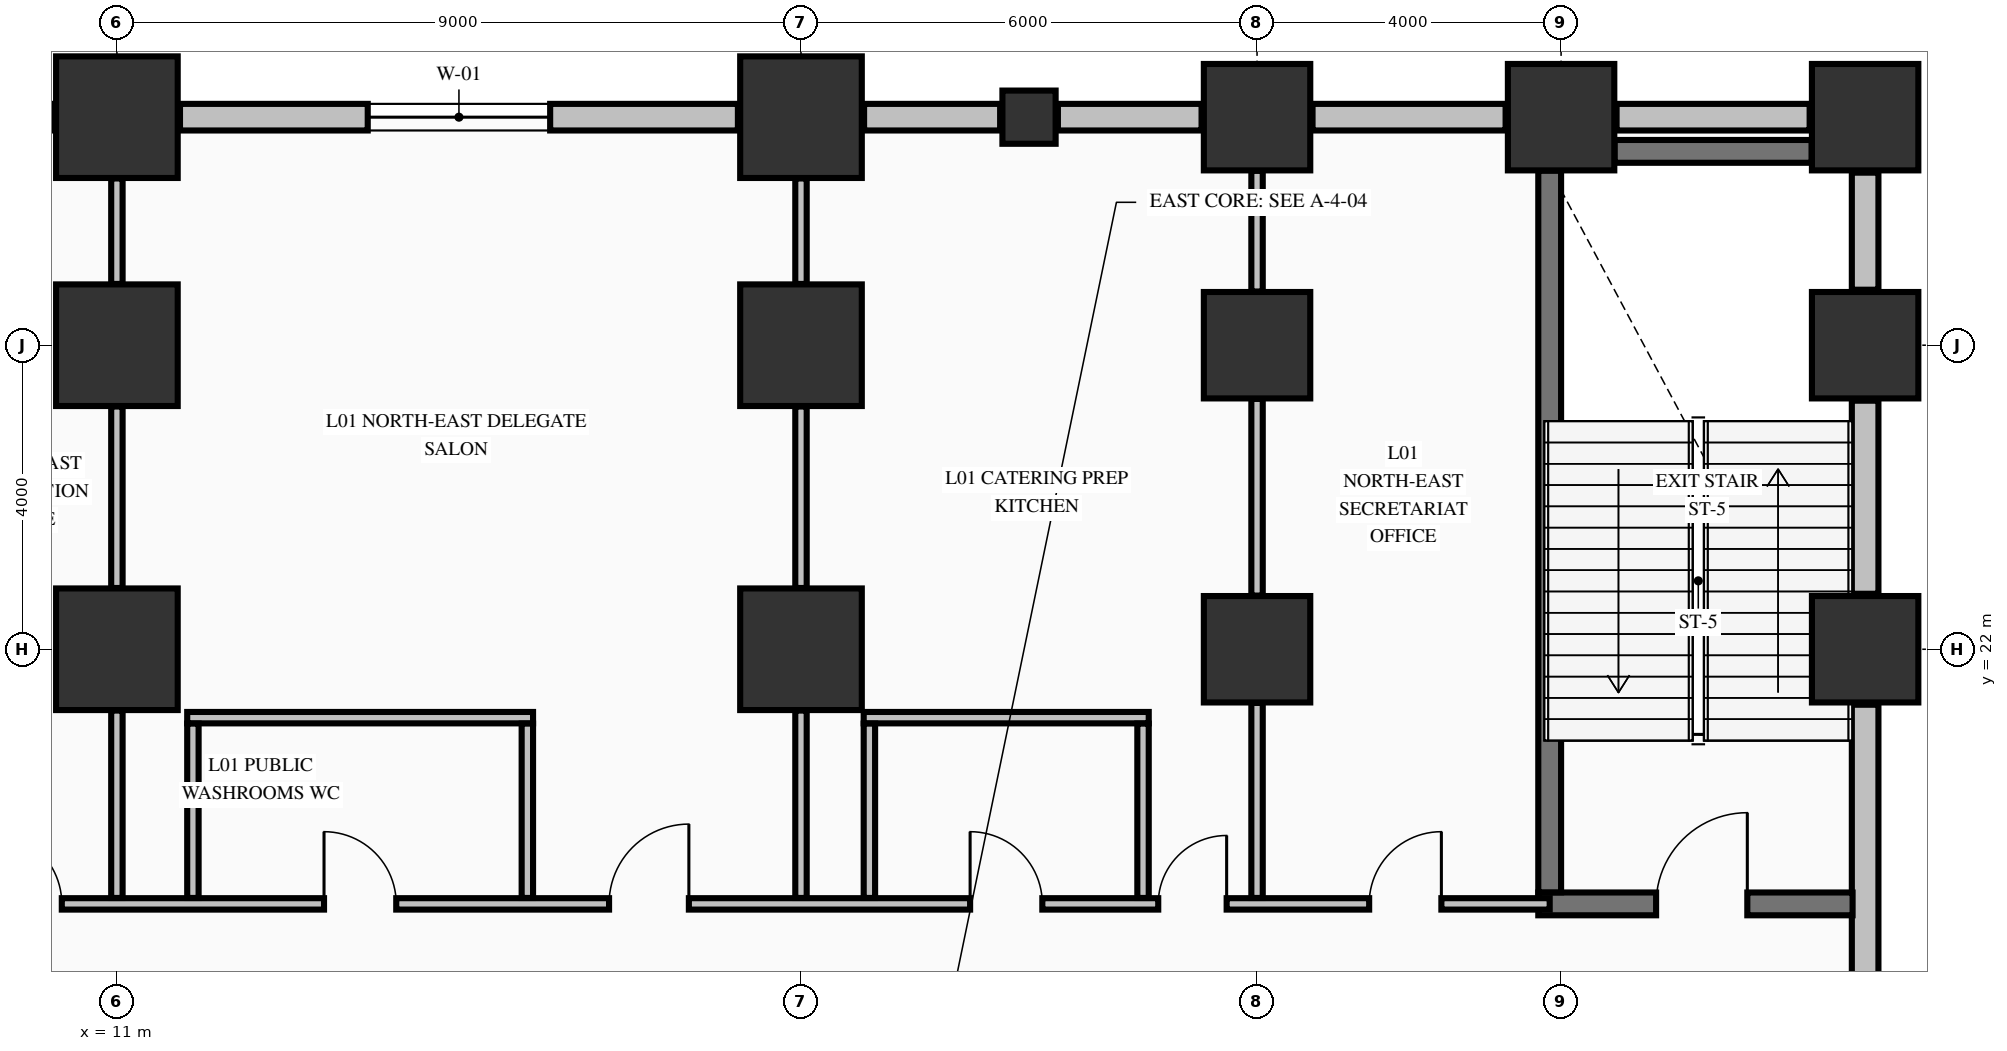
"""IFC4 building model, lengths in metres.
Left out: names, types, materials, properties, quantities, classifications, styles, units other than length and angle.
Written with IfcOpenShell. Run it as: python <this file> out.ifc"""

import sys

from ifc_helpers import new_model, si_unit, direction, frame, frame_2d, origin, origin_2d, place, context, subcontext, project, spatial, rectangle, extrude, element, fill, save


model = new_model("IFC4")
c1 = context("Model", 3, precision=1e-05, world=origin(), true_north=direction((0.0, 1.0)))
c2 = subcontext(c1, "Body", "Model", "MODEL_VIEW")
j1 = project(units=[si_unit("LENGTHUNIT", "METRE"), si_unit("PLANEANGLEUNIT", "RADIAN")], contexts=[c1])
p1 = place(None, origin())
s1 = spatial("IfcSite", under=j1, at=p1, CompositionType="ELEMENT")
p2 = place(p1, origin())
s2 = spatial("IfcBuilding", under=s1, at=p2, CompositionType="ELEMENT")
p3 = place(p2, frame((0.0, 0.0, 5.44)))
s3 = spatial("IfcBuildingStorey", under=s2, at=p3, CompositionType="ELEMENT", Elevation=5.44)
for number, where, z_axis, x_axis in (
    (1, (11.0, 22.0, 0.0), (0.0, 0.0, 1.0), (1.0, 0.0, 0.0)),
    (2, (11.0, 26.0, 0.0), (0.0, 0.0, 1.0), (1.0, 0.0, 0.0)),
    (3, (11.0, 29.0, 0.0), (0.0, 0.0, 1.0), (1.0, 0.0, 0.0)),
    (4, (20.0, 22.0, 0.0), (0.0, 0.0, 1.0), (1.0, 0.0, 0.0)),
    (5, (20.0, 26.0, 0.0), (0.0, 0.0, 1.0), (1.0, 0.0, 0.0)),
    (6, (20.0, 29.0, 0.0), (0.0, 0.0, 1.0), (1.0, 0.0, 0.0)),
):
    element("IfcColumn", number, at=place(p3, frame(where, z_axis=z_axis, x_axis=x_axis)), inside=s3, PredefinedType="COLUMN", context=c2, shape_type="SweptSolid", body=[
        extrude(rectangle(XDim=1.6, YDim=1.6, at=origin_2d()), origin(), (0.0, 0.0, 1.0), 5.09),
    ])
for number, where, z_axis, x_axis in (
    (7, (26.0, 22.0, 0.0), (0.0, 0.0, 1.0), (1.0, 0.0, 0.0)),
    (8, (26.0, 26.0, 0.0), (0.0, 0.0, 1.0), (1.0, 0.0, 0.0)),
    (9, (26.0, 29.0, 0.0), (0.0, 0.0, 1.0), (1.0, 0.0, 0.0)),
    (10, (30.0, 29.0, 0.0), (0.0, 0.0, 1.0), (1.0, 0.0, 0.0)),
    (11, (34.0, 22.0, 0.0), (0.0, 0.0, 1.0), (1.0, 0.0, 0.0)),
    (12, (34.0, 26.0, 0.0), (0.0, 0.0, 1.0), (1.0, 0.0, 0.0)),
    (13, (34.0, 29.0, 0.0), (0.0, 0.0, 1.0), (1.0, 0.0, 0.0)),
):
    element("IfcColumn", number, at=place(p3, frame(where, z_axis=z_axis, x_axis=x_axis)), inside=s3, PredefinedType="COLUMN", context=c2, shape_type="SweptSolid", body=[
        extrude(rectangle(XDim=1.4, YDim=1.4, at=origin_2d()), origin(), (0.0, 0.0, 1.0), 5.09),
    ])
p4 = place(p3, frame((23.0, 29.0, 0.0), z_axis=(0.0, 0.0, 1.0), x_axis=(1.0, 0.0, 0.0)))
e14 = element("IfcColumn", 14, at=p4, inside=s3, PredefinedType="PILASTER", context=c2, shape_type="SweptSolid", body=[
    extrude(rectangle(XDim=0.7, YDim=0.7, at=origin_2d()), origin(), (0.0, 0.0, 1.0), 5.09),
])
p5 = place(p3, frame((10.17, 29.0, 0.0), z_axis=(0.0, 0.0, 1.0), x_axis=(-1.0, 0.0, 0.0)))
e15 = element("IfcWall", 15, at=p5, inside=s3, PredefinedType="STANDARD", context=c2, shape_type="SweptSolid", body=[
    extrude(rectangle(XDim=0.94, YDim=0.35, at=frame_2d((0.47, 0.0))), origin(), (0.0, 0.0, 1.0), 4.482),
])
p6 = place(p3, frame((19.17, 29.0, 0.0), z_axis=(0.0, 0.0, 1.0), x_axis=(-1.0, 0.0, 0.0)))
e16 = element("IfcWall", 16, at=p6, inside=s3, PredefinedType="STANDARD", context=c2, shape_type="SweptSolid", body=[
    extrude(rectangle(XDim=7.34, YDim=0.35, at=frame_2d((3.67, 0.0))), origin(), (0.0, 0.0, 1.0), 4.482),
])
p7 = place(p6, frame((2.47, 0.0, 0.85)))
e17 = element("IfcOpeningElement", 17, at=p7, cuts=e16, PredefinedType="OPENING", context=c2, shape_type="SweptSolid", body=[
    extrude(rectangle(XDim=2.4, YDim=2.1, at=frame_2d((1.2, 1.05))), frame((0.0, 0.185, 0.0), z_axis=(0.0, -1.0, 0.0), x_axis=(1.0, 0.0, 0.0)), (0.0, 0.0, 1.0), 0.37),
])
p8 = place(p3, frame((22.62, 29.0, 0.0), z_axis=(0.0, 0.0, 1.0), x_axis=(-1.0, 0.0, 0.0)))
e18 = element("IfcWall", 18, at=p8, inside=s3, PredefinedType="STANDARD", context=c2, shape_type="SweptSolid", body=[
    extrude(rectangle(XDim=1.79, YDim=0.35, at=frame_2d((0.895, 0.0))), origin(), (0.0, 0.0, 1.0), 4.482),
])
p9 = place(p3, frame((25.27, 29.0, 0.0), z_axis=(0.0, 0.0, 1.0), x_axis=(-1.0, 0.0, 0.0)))
e19 = element("IfcWall", 19, at=p9, inside=s3, PredefinedType="STANDARD", context=c2, shape_type="SweptSolid", body=[
    extrude(rectangle(XDim=1.89, YDim=0.35, at=frame_2d((0.945, 0.0))), origin(), (0.0, 0.0, 1.0), 4.482),
])
for number, where, z_axis, x_axis in (
    (20, (29.27, 29.0, 0.0), (0.0, 0.0, 1.0), (-1.0, 0.0, 0.0)),
    (21, (33.27, 29.0, 0.0), (0.0, 0.0, 1.0), (-1.0, 0.0, 0.0)),
):
    element("IfcWall", number, at=place(p3, frame(where, z_axis=z_axis, x_axis=x_axis)), inside=s3, PredefinedType="STANDARD", context=c2, shape_type="SweptSolid", body=[
        extrude(rectangle(XDim=2.54, YDim=0.35, at=frame_2d((1.27, 0.0))), origin(), (0.0, 0.0, 1.0), 4.482),
    ])
p10 = place(p3, frame((34.0, 21.27, 0.0), z_axis=(0.0, 0.0, 1.0), x_axis=(0.0, -1.0, 0.0)))
e22 = element("IfcWall", 22, at=p10, inside=s3, PredefinedType="STANDARD", context=c2, shape_type="SweptSolid", body=[
    extrude(rectangle(XDim=4.54, YDim=0.35, at=frame_2d((2.27, 0.0))), origin(), (0.0, 0.0, 1.0), 5.09),
])
p11 = place(p3, frame((34.0, 25.27, 0.0), z_axis=(0.0, 0.0, 1.0), x_axis=(0.0, -1.0, 0.0)))
e23 = element("IfcWall", 23, at=p11, inside=s3, PredefinedType="STANDARD", context=c2, shape_type="SweptSolid", body=[
    extrude(rectangle(XDim=2.54, YDim=0.35, at=frame_2d((1.27, 0.0))), origin(), (0.0, 0.0, 1.0), 5.09),
])
p12 = place(p3, frame((34.0, 28.27, 0.0), z_axis=(0.0, 0.0, 1.0), x_axis=(0.0, -1.0, 0.0)))
e24 = element("IfcWall", 24, at=p12, inside=s3, PredefinedType="STANDARD", context=c2, shape_type="SweptSolid", body=[
    extrude(rectangle(XDim=1.54, YDim=0.35, at=frame_2d((0.77, 0.0))), origin(), (0.0, 0.0, 1.0), 5.09),
])
p13 = place(p3, frame((29.7, 18.65, 0.0), z_axis=(0.0, 0.0, 1.0), x_axis=(1.0, 0.0, 0.0)))
e25 = element("IfcWall", 25, at=p13, inside=s3, PredefinedType="SHEAR", context=c2, shape_type="SweptSolid", body=[
    extrude(rectangle(XDim=4.135, YDim=0.3, at=frame_2d((2.067, 0.0))), origin(), (0.0, 0.0, 1.0), 5.09),
])
p14 = place(p13, frame((1.55, 0.0, 0.0)))
e26 = element("IfcOpeningElement", 26, at=p14, cuts=e25, PredefinedType="OPENING", context=c2, shape_type="SweptSolid", body=[
    extrude(rectangle(XDim=1.2, YDim=2.15, at=frame_2d((0.6, 1.075))), frame((0.0, 0.16, 0.0), z_axis=(0.0, -1.0, 0.0), x_axis=(1.0, 0.0, 0.0)), (0.0, 0.0, 1.0), 0.32),
])
p15 = place(p3, frame((30.704, 28.55, 0.0), z_axis=(0.0, 0.0, 1.0), x_axis=(1.0, 0.0, 0.0)))
e27 = element("IfcWall", 27, at=p15, inside=s3, PredefinedType="SHEAR", context=c2, shape_type="SweptSolid", body=[
    extrude(rectangle(XDim=2.592, YDim=0.3, at=frame_2d((1.296, 0.0))), origin(), (0.0, 0.0, 1.0), 5.09),
])
p16 = place(p3, frame((-33.835, 18.65, 0.0), z_axis=(0.0, 0.0, 1.0), x_axis=(1.0, 0.0, 0.0)))
e28 = element("IfcWall", 28, at=p16, inside=s3, PredefinedType="PARTITIONING", context=c2, shape_type="SweptSolid", body=[
    extrude(rectangle(XDim=63.685, YDim=0.15, at=frame_2d((31.843, 0.0))), origin(), (0.0, 0.0, 1.0), 5.09),
])
p17 = place(p16, frame((1.285, 0.0, 0.0)))
e29 = element("IfcOpeningElement", 29, at=p17, cuts=e28, PredefinedType="OPENING", context=c2, shape_type="SweptSolid", body=[
    extrude(rectangle(XDim=1.1, YDim=2.15, at=frame_2d((0.55, 1.075))), frame((0.0, 0.085, 0.0), z_axis=(0.0, -1.0, 0.0), x_axis=(1.0, 0.0, 0.0)), (0.0, 0.0, 1.0), 0.17),
])
p18 = place(p16, frame((5.285, 0.0, 0.0)))
e30 = element("IfcOpeningElement", 30, at=p18, cuts=e28, PredefinedType="OPENING", context=c2, shape_type="SweptSolid", body=[
    extrude(rectangle(XDim=1.1, YDim=2.15, at=frame_2d((0.55, 1.075))), frame((0.0, 0.085, 0.0), z_axis=(0.0, -1.0, 0.0), x_axis=(1.0, 0.0, 0.0)), (0.0, 0.0, 1.0), 0.17),
])
p19 = place(p16, frame((10.285, 0.0, 0.0)))
e31 = element("IfcOpeningElement", 31, at=p19, cuts=e28, PredefinedType="OPENING", context=c2, shape_type="SweptSolid", body=[
    extrude(rectangle(XDim=1.1, YDim=2.15, at=frame_2d((0.55, 1.075))), frame((0.0, 0.085, 0.0), z_axis=(0.0, -1.0, 0.0), x_axis=(1.0, 0.0, 0.0)), (0.0, 0.0, 1.0), 0.17),
])
p20 = place(p16, frame((17.785, 0.0, 0.0)))
e32 = element("IfcOpeningElement", 32, at=p20, cuts=e28, PredefinedType="OPENING", context=c2, shape_type="SweptSolid", body=[
    extrude(rectangle(XDim=1.1, YDim=2.15, at=frame_2d((0.55, 1.075))), frame((0.0, 0.085, 0.0), z_axis=(0.0, -1.0, 0.0), x_axis=(1.0, 0.0, 0.0)), (0.0, 0.0, 1.0), 0.17),
])
p21 = place(p16, frame((23.56, 0.0, 0.0)))
e33 = element("IfcOpeningElement", 33, at=p21, cuts=e28, PredefinedType="OPENING", context=c2, shape_type="SweptSolid", body=[
    extrude(rectangle(XDim=0.95, YDim=2.15, at=frame_2d((0.475, 1.075))), frame((0.0, 0.085, 0.0), z_axis=(0.0, -1.0, 0.0), x_axis=(1.0, 0.0, 0.0)), (0.0, 0.0, 1.0), 0.17),
])
p22 = place(p16, frame((28.985, 0.0, 0.0)))
e34 = element("IfcOpeningElement", 34, at=p22, cuts=e28, PredefinedType="OPENING", context=c2, shape_type="SweptSolid", body=[
    extrude(rectangle(XDim=1.1, YDim=2.15, at=frame_2d((0.55, 1.075))), frame((0.0, 0.085, 0.0), z_axis=(0.0, -1.0, 0.0), x_axis=(1.0, 0.0, 0.0)), (0.0, 0.0, 1.0), 0.17),
])
p23 = place(p16, frame((37.585, 0.0, 0.0)))
e35 = element("IfcOpeningElement", 35, at=p23, cuts=e28, PredefinedType="OPENING", context=c2, shape_type="SweptSolid", body=[
    extrude(rectangle(XDim=1.1, YDim=2.15, at=frame_2d((0.55, 1.075))), frame((0.0, 0.085, 0.0), z_axis=(0.0, -1.0, 0.0), x_axis=(1.0, 0.0, 0.0)), (0.0, 0.0, 1.0), 0.17),
])
p24 = place(p16, frame((43.16, 0.0, 0.0)))
e36 = element("IfcOpeningElement", 36, at=p24, cuts=e28, PredefinedType="OPENING", context=c2, shape_type="SweptSolid", body=[
    extrude(rectangle(XDim=0.95, YDim=2.15, at=frame_2d((0.475, 1.075))), frame((0.0, 0.085, 0.0), z_axis=(0.0, -1.0, 0.0), x_axis=(1.0, 0.0, 0.0)), (0.0, 0.0, 1.0), 0.17),
])
p25 = place(p16, frame((61.31, 0.0, 0.0)))
e37 = element("IfcOpeningElement", 37, at=p25, cuts=e28, PredefinedType="OPENING", context=c2, shape_type="SweptSolid", body=[
    extrude(rectangle(XDim=0.95, YDim=2.15, at=frame_2d((0.475, 1.075))), frame((0.0, 0.085, 0.0), z_axis=(0.0, -1.0, 0.0), x_axis=(1.0, 0.0, 0.0)), (0.0, 0.0, 1.0), 0.17),
])
p26 = place(p16, frame((47.56, 0.0, 0.0)))
e38 = element("IfcOpeningElement", 38, at=p26, cuts=e28, PredefinedType="OPENING", context=c2, shape_type="SweptSolid", body=[
    extrude(rectangle(XDim=0.95, YDim=2.15, at=frame_2d((0.475, 1.075))), frame((0.0, 0.085, 0.0), z_axis=(0.0, -1.0, 0.0), x_axis=(1.0, 0.0, 0.0)), (0.0, 0.0, 1.0), 0.17),
])
p27 = place(p16, frame((51.31, 0.0, 0.0)))
e39 = element("IfcOpeningElement", 39, at=p27, cuts=e28, PredefinedType="OPENING", context=c2, shape_type="SweptSolid", body=[
    extrude(rectangle(XDim=1.05, YDim=2.15, at=frame_2d((0.525, 1.075))), frame((0.0, 0.085, 0.0), z_axis=(0.0, -1.0, 0.0), x_axis=(1.0, 0.0, 0.0)), (0.0, 0.0, 1.0), 0.17),
])
p28 = place(p16, frame((56.06, 0.0, 0.0)))
e40 = element("IfcOpeningElement", 40, at=p28, cuts=e28, PredefinedType="OPENING", context=c2, shape_type="SweptSolid", body=[
    extrude(rectangle(XDim=0.95, YDim=2.15, at=frame_2d((0.475, 1.075))), frame((0.0, 0.085, 0.0), z_axis=(0.0, -1.0, 0.0), x_axis=(1.0, 0.0, 0.0)), (0.0, 0.0, 1.0), 0.17),
])
p29 = place(p16, frame((58.535, 0.0, 0.0)))
e41 = element("IfcOpeningElement", 41, at=p29, cuts=e28, PredefinedType="OPENING", context=c2, shape_type="SweptSolid", body=[
    extrude(rectangle(XDim=0.9, YDim=2.15, at=frame_2d((0.45, 1.075))), frame((0.0, 0.085, 0.0), z_axis=(0.0, -1.0, 0.0), x_axis=(1.0, 0.0, 0.0)), (0.0, 0.0, 1.0), 0.17),
])
p30 = place(p3, frame((11.925, 21.1, 0.0), z_axis=(0.0, 0.0, 1.0), x_axis=(1.0, 0.0, 0.0)))
e42 = element("IfcWall", 42, at=p30, inside=s3, PredefinedType="PARTITIONING", context=c2, shape_type="SweptSolid", body=[
    extrude(rectangle(XDim=4.55, YDim=0.15, at=frame_2d((2.275, 0.0))), origin(), (0.0, 0.0, 1.0), 5.09),
])
p31 = place(p3, frame((20.825, 21.1, 0.0), z_axis=(0.0, 0.0, 1.0), x_axis=(1.0, 0.0, 0.0)))
e43 = element("IfcWall", 43, at=p31, inside=s3, PredefinedType="PARTITIONING", context=c2, shape_type="SweptSolid", body=[
    extrude(rectangle(XDim=3.75, YDim=0.15, at=frame_2d((1.875, 0.0))), origin(), (0.0, 0.0, 1.0), 5.09),
])
p32 = place(p3, frame((29.85, 18.802, 0.0), z_axis=(0.0, 0.0, 1.0), x_axis=(0.0, 1.0, 0.0)))
e44 = element("IfcWall", 44, at=p32, inside=s3, PredefinedType="SHEAR", context=c2, shape_type="SweptSolid", body=[
    extrude(rectangle(XDim=9.494, YDim=0.3, at=frame_2d((4.747, 0.0))), origin(), (0.0, 0.0, 1.0), 5.09),
])
p33 = place(p3, frame((11.0, 18.728, 0.0), z_axis=(0.0, 0.0, 1.0), x_axis=(0.0, 1.0, 0.0)))
e45 = element("IfcWall", 45, at=p33, inside=s3, PredefinedType="PARTITIONING", context=c2, shape_type="SweptSolid", body=[
    extrude(rectangle(XDim=2.466, YDim=0.15, at=frame_2d((1.233, 0.0))), origin(), (0.0, 0.0, 1.0), 4.132),
])
p34 = place(p3, frame((11.0, 22.806, 0.0), z_axis=(0.0, 0.0, 1.0), x_axis=(0.0, 1.0, 0.0)))
e46 = element("IfcWall", 46, at=p34, inside=s3, PredefinedType="PARTITIONING", context=c2, shape_type="SweptSolid", body=[
    extrude(rectangle(XDim=2.388, YDim=0.15, at=frame_2d((1.194, 0.0))), origin(), (0.0, 0.0, 1.0), 4.132),
])
p35 = place(p3, frame((11.0, 26.806, 0.0), z_axis=(0.0, 0.0, 1.0), x_axis=(0.0, 1.0, 0.0)))
e47 = element("IfcWall", 47, at=p35, inside=s3, PredefinedType="PARTITIONING", context=c2, shape_type="SweptSolid", body=[
    extrude(rectangle(XDim=1.388, YDim=0.15, at=frame_2d((0.694, 0.0))), origin(), (0.0, 0.0, 1.0), 4.132),
])
for number, where, z_axis, x_axis in (
    (48, (12.0, 18.728, 0.0), (0.0, 0.0, 1.0), (0.0, 1.0, 0.0)),
    (49, (16.4, 18.728, 0.0), (0.0, 0.0, 1.0), (0.0, 1.0, 0.0)),
):
    element("IfcWall", number, at=place(p3, frame(where, z_axis=z_axis, x_axis=x_axis)), inside=s3, PredefinedType="PARTITIONING", context=c2, shape_type="SweptSolid", body=[
        extrude(rectangle(XDim=2.294, YDim=0.15, at=frame_2d((1.147, 0.0))), origin(), (0.0, 0.0, 1.0), 5.09),
    ])
p36 = place(p3, frame((20.0, 18.728, 0.0), z_axis=(0.0, 0.0, 1.0), x_axis=(0.0, 1.0, 0.0)))
e50 = element("IfcWall", 50, at=p36, inside=s3, PredefinedType="PARTITIONING", context=c2, shape_type="SweptSolid", body=[
    extrude(rectangle(XDim=2.466, YDim=0.15, at=frame_2d((1.233, 0.0))), origin(), (0.0, 0.0, 1.0), 4.132),
])
p37 = place(p3, frame((20.0, 22.806, 0.0), z_axis=(0.0, 0.0, 1.0), x_axis=(0.0, 1.0, 0.0)))
e51 = element("IfcWall", 51, at=p37, inside=s3, PredefinedType="PARTITIONING", context=c2, shape_type="SweptSolid", body=[
    extrude(rectangle(XDim=2.388, YDim=0.15, at=frame_2d((1.194, 0.0))), origin(), (0.0, 0.0, 1.0), 4.132),
])
p38 = place(p3, frame((20.0, 26.806, 0.0), z_axis=(0.0, 0.0, 1.0), x_axis=(0.0, 1.0, 0.0)))
e52 = element("IfcWall", 52, at=p38, inside=s3, PredefinedType="PARTITIONING", context=c2, shape_type="SweptSolid", body=[
    extrude(rectangle(XDim=1.388, YDim=0.15, at=frame_2d((0.694, 0.0))), origin(), (0.0, 0.0, 1.0), 4.132),
])
for number, where, z_axis, x_axis in (
    (53, (20.9, 18.728, 0.0), (0.0, 0.0, 1.0), (0.0, 1.0, 0.0)),
    (54, (24.5, 18.728, 0.0), (0.0, 0.0, 1.0), (0.0, 1.0, 0.0)),
):
    element("IfcWall", number, at=place(p3, frame(where, z_axis=z_axis, x_axis=x_axis)), inside=s3, PredefinedType="PARTITIONING", context=c2, shape_type="SweptSolid", body=[
        extrude(rectangle(XDim=2.294, YDim=0.15, at=frame_2d((1.147, 0.0))), origin(), (0.0, 0.0, 1.0), 5.09),
    ])
p39 = place(p3, frame((26.0, 18.728, 0.0), z_axis=(0.0, 0.0, 1.0), x_axis=(0.0, 1.0, 0.0)))
e55 = element("IfcWall", 55, at=p39, inside=s3, PredefinedType="PARTITIONING", context=c2, shape_type="SweptSolid", body=[
    extrude(rectangle(XDim=2.566, YDim=0.15, at=frame_2d((1.283, 0.0))), origin(), (0.0, 0.0, 1.0), 4.132),
])
p40 = place(p3, frame((26.0, 22.706, 0.0), z_axis=(0.0, 0.0, 1.0), x_axis=(0.0, 1.0, 0.0)))
e56 = element("IfcWall", 56, at=p40, inside=s3, PredefinedType="PARTITIONING", context=c2, shape_type="SweptSolid", body=[
    extrude(rectangle(XDim=2.588, YDim=0.15, at=frame_2d((1.294, 0.0))), origin(), (0.0, 0.0, 1.0), 4.132),
])
p41 = place(p3, frame((26.0, 26.706, 0.0), z_axis=(0.0, 0.0, 1.0), x_axis=(0.0, 1.0, 0.0)))
e57 = element("IfcWall", 57, at=p41, inside=s3, PredefinedType="PARTITIONING", context=c2, shape_type="SweptSolid", body=[
    extrude(rectangle(XDim=1.588, YDim=0.15, at=frame_2d((0.794, 0.0))), origin(), (0.0, 0.0, 1.0), 4.132),
])
p42 = place(p7, origin())
e58 = element("IfcWindow", 58, at=p42, inside=s3, PartitioningType="SINGLE_PANEL", PredefinedType="WINDOW", context=c2, shape_type="SweptSolid", body=[
    extrude(rectangle(XDim=2.4, YDim=2.1, at=frame_2d((1.2, 1.05))), frame((0.0, 0.03, 0.0), z_axis=(0.0, -1.0, 0.0), x_axis=(1.0, 0.0, 0.0)), (0.0, 0.0, 1.0), 0.06),
])
fill(e17, e58)
p43 = place(p14, origin())
e59 = element("IfcDoor", 59, at=p43, inside=s3, OperationType="SINGLE_SWING_RIGHT", PredefinedType="DOOR", context=c2, shape_type="SweptSolid", body=[
    extrude(rectangle(XDim=1.2, YDim=2.15, at=frame_2d((0.6, 1.075))), frame((0.0, 0.025, 0.0), z_axis=(0.0, -1.0, 0.0), x_axis=(1.0, 0.0, 0.0)), (0.0, 0.0, 1.0), 0.05),
])
fill(e26, e59)
p44 = place(p24, origin())
e60 = element("IfcDoor", 60, at=p44, inside=s3, OperationType="SINGLE_SWING_LEFT", PredefinedType="DOOR", context=c2, shape_type="SweptSolid", body=[
    extrude(rectangle(XDim=0.95, YDim=2.15, at=frame_2d((0.475, 1.075))), frame((0.0, 0.025, 0.0), z_axis=(0.0, -1.0, 0.0), x_axis=(1.0, 0.0, 0.0)), (0.0, 0.0, 1.0), 0.05),
])
fill(e36, e60)
p45 = place(p25, origin())
e61 = element("IfcDoor", 61, at=p45, inside=s3, OperationType="SINGLE_SWING_RIGHT", PredefinedType="DOOR", context=c2, shape_type="SweptSolid", body=[
    extrude(rectangle(XDim=0.95, YDim=2.15, at=frame_2d((0.475, 1.075))), frame((0.0, 0.025, 0.0), z_axis=(0.0, -1.0, 0.0), x_axis=(1.0, 0.0, 0.0)), (0.0, 0.0, 1.0), 0.05),
])
fill(e37, e61)
p46 = place(p26, origin())
e62 = element("IfcDoor", 62, at=p46, inside=s3, OperationType="SINGLE_SWING_LEFT", PredefinedType="DOOR", context=c2, shape_type="SweptSolid", body=[
    extrude(rectangle(XDim=0.95, YDim=2.15, at=frame_2d((0.475, 1.075))), frame((0.0, 0.025, 0.0), z_axis=(0.0, -1.0, 0.0), x_axis=(1.0, 0.0, 0.0)), (0.0, 0.0, 1.0), 0.05),
])
fill(e38, e62)
p47 = place(p27, origin())
e63 = element("IfcDoor", 63, at=p47, inside=s3, OperationType="SINGLE_SWING_RIGHT", PredefinedType="DOOR", context=c2, shape_type="SweptSolid", body=[
    extrude(rectangle(XDim=1.05, YDim=2.15, at=frame_2d((0.525, 1.075))), frame((0.0, 0.025, 0.0), z_axis=(0.0, -1.0, 0.0), x_axis=(1.0, 0.0, 0.0)), (0.0, 0.0, 1.0), 0.05),
])
fill(e39, e63)
p48 = place(p28, origin())
e64 = element("IfcDoor", 64, at=p48, inside=s3, OperationType="SINGLE_SWING_LEFT", PredefinedType="DOOR", context=c2, shape_type="SweptSolid", body=[
    extrude(rectangle(XDim=0.95, YDim=2.15, at=frame_2d((0.475, 1.075))), frame((0.0, 0.025, 0.0), z_axis=(0.0, -1.0, 0.0), x_axis=(1.0, 0.0, 0.0)), (0.0, 0.0, 1.0), 0.05),
])
fill(e40, e64)
p49 = place(p29, origin())
e65 = element("IfcDoor", 65, at=p49, inside=s3, OperationType="SINGLE_SWING_RIGHT", PredefinedType="DOOR", context=c2, shape_type="SweptSolid", body=[
    extrude(rectangle(XDim=0.9, YDim=2.15, at=frame_2d((0.45, 1.075))), frame((0.0, 0.025, 0.0), z_axis=(0.0, -1.0, 0.0), x_axis=(1.0, 0.0, 0.0)), (0.0, 0.0, 1.0), 0.05),
])
fill(e41, e65)
save(model, sys.argv[1])
